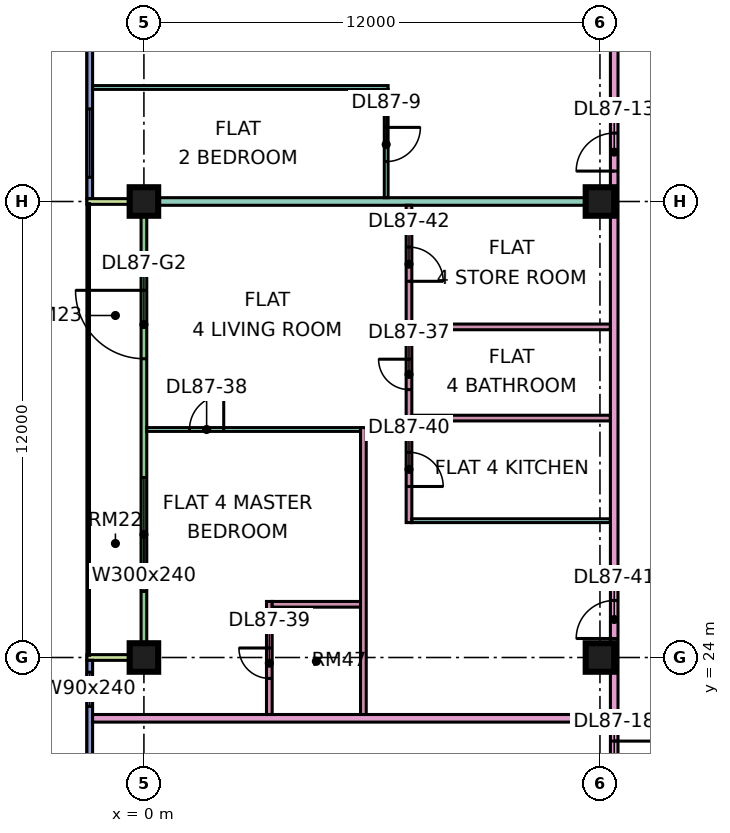
"""IFC4 building model, lengths in metres.
Left out: names, types, materials, properties, quantities, classifications, styles, units other than length and angle.
Written with IfcOpenShell. Run it as: python <this file> out.ifc"""

import sys

from ifc_helpers import new_model, si_unit, direction, frame, frame_2d, origin, origin_2d, place, context, subcontext, project, spatial, rectangle, extrude, element, fill, save


model = new_model("IFC4")
c1 = context("Model", 3, precision=1e-05, world=origin(), true_north=direction((0.0, 1.0)))
c2 = subcontext(c1, "Body", "Model", "MODEL_VIEW")
j1 = project(units=[si_unit("LENGTHUNIT", "METRE"), si_unit("PLANEANGLEUNIT", "RADIAN")], contexts=[c1])
p1 = place(None, origin())
s1 = spatial("IfcSite", under=j1, at=p1, CompositionType="ELEMENT")
p2 = place(p1, origin())
s2 = spatial("IfcBuilding", under=s1, at=p2, CompositionType="ELEMENT")
p3 = place(p2, frame((0.0, 0.0, 372.65)))
s3 = spatial("IfcBuildingStorey", under=s2, at=p3, CompositionType="ELEMENT", Elevation=372.65)
p4 = place(p3, frame((0.0, 24.0, 0.0), z_axis=(0.0, 0.0, 1.0), x_axis=(1.0, 0.0, 0.0)))
e1 = element("IfcColumn", 1, at=p4, inside=s3, PredefinedType="COLUMN", context=c2, shape_type="SweptSolid", body=[
    extrude(rectangle(XDim=0.75, YDim=0.75, at=origin_2d()), origin(), (0.0, 0.0, 1.0), 3.75),
])
p5 = place(p3, frame((0.0, 36.0, 0.0), z_axis=(0.0, 0.0, 1.0), x_axis=(1.0, 0.0, 0.0)))
e2 = element("IfcColumn", 2, at=p5, inside=s3, PredefinedType="COLUMN", context=c2, shape_type="SweptSolid", body=[
    extrude(rectangle(XDim=0.75, YDim=0.75, at=origin_2d()), origin(), (0.0, 0.0, 1.0), 3.75),
])
for number, where, z_axis, x_axis in (
    (3, (12.0, 24.0, 0.0), (0.0, 0.0, 1.0), (1.0, 0.0, 0.0)),
    (4, (12.0, 36.0, 0.0), (0.0, 0.0, 1.0), (1.0, 0.0, 0.0)),
):
    element("IfcColumn", number, at=place(p3, frame(where, z_axis=z_axis, x_axis=x_axis)), inside=s3, PredefinedType="COLUMN", context=c2, shape_type="SweptSolid", body=[
        extrude(rectangle(XDim=0.75, YDim=0.75, at=origin_2d()), origin(), (0.0, 0.0, 1.0), 3.75),
    ])
p6 = place(p3, frame((-1.425, 47.925, 0.0), z_axis=(0.0, 0.0, 1.0), x_axis=(0.0, -1.0, 0.0)))
e5 = element("IfcWall", 5, at=p6, inside=s3, PredefinedType="SOLIDWALL", context=c2, shape_type="SweptSolid", body=[
    extrude(rectangle(XDim=11.85, YDim=0.15, at=frame_2d((5.925, 0.0))), origin(), (0.0, 0.0, 1.0), 3.35),
])
p7 = place(p6, frame((0.562, 0.0, 0.45)))
e6 = element("IfcOpeningElement", 6, at=p7, cuts=e5, PredefinedType="OPENING", context=c2, shape_type="SweptSolid", body=[
    extrude(rectangle(XDim=1.8, YDim=2.4, at=frame_2d((0.9, 1.2))), frame((0.0, 0.085, 0.0), z_axis=(0.0, -1.0, 0.0), x_axis=(1.0, 0.0, 0.0)), (0.0, 0.0, 1.0), 0.17),
])
p8 = place(p6, frame((4.425, 0.0, 0.45)))
e7 = element("IfcOpeningElement", 7, at=p8, cuts=e5, PredefinedType="OPENING", context=c2, shape_type="SweptSolid", body=[
    extrude(rectangle(XDim=3.0, YDim=2.4, at=frame_2d((1.5, 1.2))), frame((0.0, 0.085, 0.0), z_axis=(0.0, -1.0, 0.0), x_axis=(1.0, 0.0, 0.0)), (0.0, 0.0, 1.0), 0.17),
])
p9 = place(p6, frame((9.488, 0.0, 0.45)))
e8 = element("IfcOpeningElement", 8, at=p9, cuts=e5, PredefinedType="OPENING", context=c2, shape_type="SweptSolid", body=[
    extrude(rectangle(XDim=1.8, YDim=2.4, at=frame_2d((0.9, 1.2))), frame((0.0, 0.085, 0.0), z_axis=(0.0, -1.0, 0.0), x_axis=(1.0, 0.0, 0.0)), (0.0, 0.0, 1.0), 0.17),
])
p10 = place(p3, frame((0.0, 35.925, 0.0), z_axis=(0.0, 0.0, 1.0), x_axis=(0.0, -1.0, 0.0)))
e9 = element("IfcWall", 9, at=p10, inside=s3, PredefinedType="SOLIDWALL", context=c2, shape_type="SweptSolid", body=[
    extrude(rectangle(XDim=11.85, YDim=0.15, at=frame_2d((5.925, 0.0))), origin(), (0.0, 0.0, 1.0), 3.35),
])
p11 = place(p10, frame((2.262, 0.0, 0.0)))
e10 = element("IfcOpeningElement", 10, at=p11, cuts=e9, PredefinedType="OPENING", context=c2, shape_type="SweptSolid", body=[
    extrude(rectangle(XDim=1.8, YDim=2.4, at=frame_2d((0.9, 1.2))), frame((0.0, 0.085, 0.0), z_axis=(0.0, -1.0, 0.0), x_axis=(1.0, 0.0, 0.0)), (0.0, 0.0, 1.0), 0.17),
])
p12 = place(p10, frame((7.188, 0.0, 0.45)))
e11 = element("IfcOpeningElement", 11, at=p12, cuts=e9, PredefinedType="OPENING", context=c2, shape_type="SweptSolid", body=[
    extrude(rectangle(XDim=3.0, YDim=2.4, at=frame_2d((1.5, 1.2))), frame((0.0, 0.085, 0.0), z_axis=(0.0, -1.0, 0.0), x_axis=(1.0, 0.0, 0.0)), (0.0, 0.0, 1.0), 0.17),
])
for number, where, z_axis, x_axis in (
    (12, (-1.5, 36.0, 0.0), (0.0, 0.0, 1.0), (1.0, 0.0, 0.0)),
    (13, (-1.5, 24.0, 0.0), (0.0, 0.0, 1.0), (1.0, 0.0, 0.0)),
):
    element("IfcWall", number, at=place(p3, frame(where, z_axis=z_axis, x_axis=x_axis)), inside=s3, PredefinedType="SOLIDWALL", context=c2, shape_type="SweptSolid", body=[
        extrude(rectangle(XDim=1.5, YDim=0.15, at=frame_2d((0.75, 0.0))), origin(), (0.0, 0.0, 1.0), 3.35),
    ])
p13 = place(p3, frame((-1.425, 23.925, 0.0), z_axis=(0.0, 0.0, 1.0), x_axis=(0.0, -1.0, 0.0)))
e14 = element("IfcWall", 14, at=p13, inside=s3, PredefinedType="SOLIDWALL", context=c2, shape_type="SweptSolid", body=[
    extrude(rectangle(XDim=11.425, YDim=0.15, at=frame_2d((5.712, 0.0))), origin(), (0.0, 0.0, 1.0), 3.35),
])
p14 = place(p13, frame((0.312, 0.0, 0.45)))
e15 = element("IfcOpeningElement", 15, at=p14, cuts=e14, PredefinedType="OPENING", context=c2, shape_type="SweptSolid", body=[
    extrude(rectangle(XDim=0.9, YDim=2.4, at=frame_2d((0.45, 1.2))), frame((0.0, 0.085, 0.0), z_axis=(0.0, -1.0, 0.0), x_axis=(1.0, 0.0, 0.0)), (0.0, 0.0, 1.0), 0.17),
])
p15 = place(p13, frame((6.175, 0.0, 0.45)))
e16 = element("IfcOpeningElement", 16, at=p15, cuts=e14, PredefinedType="OPENING", context=c2, shape_type="SweptSolid", body=[
    extrude(rectangle(XDim=3.0, YDim=2.4, at=frame_2d((1.5, 1.2))), frame((0.0, 0.085, 0.0), z_axis=(0.0, -1.0, 0.0), x_axis=(1.0, 0.0, 0.0)), (0.0, 0.0, 1.0), 0.17),
])
p16 = place(p3, frame((-1.35, 22.4, 0.0), z_axis=(0.0, 0.0, 1.0), x_axis=(1.0, 0.0, 0.0)))
e17 = element("IfcWall", 17, at=p16, inside=s3, PredefinedType="PARTITIONING", context=c2, shape_type="SweptSolid", body=[
    extrude(rectangle(XDim=13.625, YDim=0.2, at=frame_2d((6.812, 0.0))), origin(), (0.0, 0.0, 1.0), 3.35),
])
e18 = element("IfcWall", 18, at=p5, inside=s3, PredefinedType="PARTITIONING", context=c2, shape_type="SweptSolid", body=[
    extrude(rectangle(XDim=12.275, YDim=0.2, at=frame_2d((6.137, 0.0))), origin(), (0.0, 0.0, 1.0), 3.35),
])
p17 = place(p3, frame((-1.35, 39.0, 0.0), z_axis=(0.0, 0.0, 1.0), x_axis=(1.0, 0.0, 0.0)))
e19 = element("IfcWall", 19, at=p17, inside=s3, PredefinedType="PARTITIONING", context=c2, shape_type="SweptSolid", body=[
    extrude(rectangle(XDim=7.775, YDim=0.1, at=frame_2d((3.888, 0.0))), origin(), (0.0, 0.0, 1.0), 3.35),
])
p18 = place(p3, frame((0.074, 30.0, 0.0), z_axis=(0.0, 0.0, 1.0), x_axis=(1.0, 0.0, 0.0)))
e20 = element("IfcWall", 20, at=p18, inside=s3, PredefinedType="PARTITIONING", context=c2, shape_type="SweptSolid", body=[
    extrude(rectangle(XDim=5.626, YDim=0.1, at=frame_2d((2.813, 0.0))), origin(), (0.0, 0.0, 1.0), 3.35),
])
p19 = place(p18, frame((1.126, 0.0, 0.0)))
e21 = element("IfcOpeningElement", 21, at=p19, cuts=e20, PredefinedType="OPENING", context=c2, shape_type="SweptSolid", body=[
    extrude(rectangle(XDim=0.9, YDim=2.1, at=frame_2d((0.45, 1.05))), frame((0.0, 0.06, 0.0), z_axis=(0.0, -1.0, 0.0), x_axis=(1.0, 0.0, 0.0)), (0.0, 0.0, 1.0), 0.12),
])
p20 = place(p3, frame((3.3, 22.5, 0.0), z_axis=(0.0, 0.0, 1.0), x_axis=(0.0, 1.0, 0.0)))
e22 = element("IfcWall", 22, at=p20, inside=s3, PredefinedType="PARTITIONING", context=c2, shape_type="SweptSolid", body=[
    extrude(rectangle(XDim=2.975, YDim=0.15, at=frame_2d((1.488, 0.0))), origin(), (0.0, 0.0, 1.0), 3.35),
])
p21 = place(p20, frame((0.95, 0.0, 0.0)))
e23 = element("IfcOpeningElement", 23, at=p21, cuts=e22, PredefinedType="OPENING", context=c2, shape_type="SweptSolid", body=[
    extrude(rectangle(XDim=0.8, YDim=2.1, at=frame_2d((0.4, 1.05))), frame((0.0, 0.085, 0.0), z_axis=(0.0, -1.0, 0.0), x_axis=(1.0, 0.0, 0.0)), (0.0, 0.0, 1.0), 0.17),
])
p22 = place(p3, frame((3.375, 25.4, 0.0), z_axis=(0.0, 0.0, 1.0), x_axis=(1.0, 0.0, 0.0)))
e24 = element("IfcWall", 24, at=p22, inside=s3, PredefinedType="PARTITIONING", context=c2, shape_type="SweptSolid", body=[
    extrude(rectangle(XDim=2.325, YDim=0.15, at=frame_2d((1.163, 0.0))), origin(), (0.0, 0.0, 1.0), 3.35),
])
p23 = place(p3, frame((5.775, 22.5, 0.0), z_axis=(0.0, 0.0, 1.0), x_axis=(0.0, 1.0, 0.0)))
e25 = element("IfcWall", 25, at=p23, inside=s3, PredefinedType="PARTITIONING", context=c2, shape_type="SweptSolid", body=[
    extrude(rectangle(XDim=7.55, YDim=0.15, at=frame_2d((3.775, 0.0))), origin(), (0.0, 0.0, 1.0), 3.35),
])
p24 = place(p3, frame((6.375, 36.1, 0.0), z_axis=(0.0, 0.0, 1.0), x_axis=(0.0, 1.0, 0.0)))
e26 = element("IfcWall", 26, at=p24, inside=s3, PredefinedType="PARTITIONING", context=c2, shape_type="SweptSolid", body=[
    extrude(rectangle(XDim=2.85, YDim=0.1, at=frame_2d((1.425, 0.0))), origin(), (0.0, 0.0, 1.0), 3.35),
])
p25 = place(p24, frame((0.95, 0.0, 0.0)))
e27 = element("IfcOpeningElement", 27, at=p25, cuts=e26, PredefinedType="OPENING", context=c2, shape_type="SweptSolid", body=[
    extrude(rectangle(XDim=0.9, YDim=2.1, at=frame_2d((0.45, 1.05))), frame((0.0, 0.06, 0.0), z_axis=(0.0, -1.0, 0.0), x_axis=(1.0, 0.0, 0.0)), (0.0, 0.0, 1.0), 0.12),
])
p26 = place(p3, frame((6.975, 27.55, 0.0), z_axis=(0.0, 0.0, 1.0), x_axis=(0.0, 1.0, 0.0)))
e28 = element("IfcWall", 28, at=p26, inside=s3, PredefinedType="PARTITIONING", context=c2, shape_type="SweptSolid", body=[
    extrude(rectangle(XDim=8.35, YDim=0.15, at=frame_2d((4.175, 0.0))), origin(), (0.0, 0.0, 1.0), 3.35),
])
p27 = place(p26, frame((3.5, 0.0, 0.0)))
e29 = element("IfcOpeningElement", 29, at=p27, cuts=e28, PredefinedType="OPENING", context=c2, shape_type="SweptSolid", body=[
    extrude(rectangle(XDim=0.8, YDim=2.1, at=frame_2d((0.4, 1.05))), frame((0.0, 0.085, 0.0), z_axis=(0.0, -1.0, 0.0), x_axis=(1.0, 0.0, 0.0)), (0.0, 0.0, 1.0), 0.17),
])
p28 = place(p26, frame((0.95, 0.0, 0.0)))
e30 = element("IfcOpeningElement", 30, at=p28, cuts=e28, PredefinedType="OPENING", context=c2, shape_type="SweptSolid", body=[
    extrude(rectangle(XDim=0.9, YDim=2.1, at=frame_2d((0.45, 1.05))), frame((0.0, 0.085, 0.0), z_axis=(0.0, -1.0, 0.0), x_axis=(1.0, 0.0, 0.0)), (0.0, 0.0, 1.0), 0.17),
])
p29 = place(p26, frame((6.35, 0.0, 0.0)))
e31 = element("IfcOpeningElement", 31, at=p29, cuts=e28, PredefinedType="OPENING", context=c2, shape_type="SweptSolid", body=[
    extrude(rectangle(XDim=0.9, YDim=2.1, at=frame_2d((0.45, 1.05))), frame((0.0, 0.085, 0.0), z_axis=(0.0, -1.0, 0.0), x_axis=(1.0, 0.0, 0.0)), (0.0, 0.0, 1.0), 0.17),
])
p30 = place(p3, frame((7.05, 27.6, 0.0), z_axis=(0.0, 0.0, 1.0), x_axis=(1.0, 0.0, 0.0)))
e32 = element("IfcWall", 32, at=p30, inside=s3, PredefinedType="PARTITIONING", context=c2, shape_type="SweptSolid", body=[
    extrude(rectangle(XDim=5.225, YDim=0.1, at=frame_2d((2.612, 0.0))), origin(), (0.0, 0.0, 1.0), 3.35),
])
for number, where, z_axis, x_axis in (
    (33, (7.05, 30.3, 0.0), (0.0, 0.0, 1.0), (1.0, 0.0, 0.0)),
    (34, (7.05, 32.7, 0.0), (0.0, 0.0, 1.0), (1.0, 0.0, 0.0)),
):
    element("IfcWall", number, at=place(p3, frame(where, z_axis=z_axis, x_axis=x_axis)), inside=s3, PredefinedType="PARTITIONING", context=c2, shape_type="SweptSolid", body=[
        extrude(rectangle(XDim=5.225, YDim=0.15, at=frame_2d((2.612, 0.0))), origin(), (0.0, 0.0, 1.0), 3.35),
    ])
p31 = place(p3, frame((12.375, 20.0, 0.0), z_axis=(0.0, 0.0, 1.0), x_axis=(0.0, 1.0, 0.0)))
e35 = element("IfcWall", 35, at=p31, inside=s3, PredefinedType="PARTITIONING", context=c2, shape_type="SweptSolid", body=[
    extrude(rectangle(XDim=34.0, YDim=0.2, at=frame_2d((17.0, 0.0))), origin(), (0.0, 0.0, 1.0), 3.35),
])
p32 = place(p31, frame((16.8, 0.0, 0.0)))
e36 = element("IfcOpeningElement", 36, at=p32, cuts=e35, PredefinedType="OPENING", context=c2, shape_type="SweptSolid", body=[
    extrude(rectangle(XDim=1.0, YDim=2.1, at=frame_2d((0.5, 1.05))), frame((0.0, 0.11, 0.0), z_axis=(0.0, -1.0, 0.0), x_axis=(1.0, 0.0, 0.0)), (0.0, 0.0, 1.0), 0.22),
])
p33 = place(p31, frame((0.6, 0.0, 0.0)))
e37 = element("IfcOpeningElement", 37, at=p33, cuts=e35, PredefinedType="OPENING", context=c2, shape_type="SweptSolid", body=[
    extrude(rectangle(XDim=1.2, YDim=2.1, at=frame_2d((0.6, 1.05))), frame((0.0, 0.11, 0.0), z_axis=(0.0, -1.0, 0.0), x_axis=(1.0, 0.0, 0.0)), (0.0, 0.0, 1.0), 0.22),
])
p34 = place(p31, frame((4.5, 0.0, 0.0)))
e38 = element("IfcOpeningElement", 38, at=p34, cuts=e35, PredefinedType="OPENING", context=c2, shape_type="SweptSolid", body=[
    extrude(rectangle(XDim=1.0, YDim=2.1, at=frame_2d((0.5, 1.05))), frame((0.0, 0.11, 0.0), z_axis=(0.0, -1.0, 0.0), x_axis=(1.0, 0.0, 0.0)), (0.0, 0.0, 1.0), 0.22),
])
p35 = place(p9, origin())
e39 = element("IfcWindow", 39, at=p35, inside=s3, PartitioningType="SINGLE_PANEL", PredefinedType="WINDOW", context=c2, shape_type="SweptSolid", body=[
    extrude(rectangle(XDim=1.8, YDim=2.4, at=frame_2d((0.9, 1.2))), frame((0.0, 0.03, 0.0), z_axis=(0.0, -1.0, 0.0), x_axis=(1.0, 0.0, 0.0)), (0.0, 0.0, 1.0), 0.06),
])
fill(e8, e39)
p36 = place(p11, frame((1.8, 0.0, 0.0), z_axis=(0.0, 0.0, 1.0), x_axis=(-1.0, 0.0, 0.0)))
e40 = element("IfcDoor", 40, at=p36, inside=s3, OperationType="DOUBLE_DOOR_SINGLE_SWING", PredefinedType="DOOR", context=c2, shape_type="SweptSolid", body=[
    extrude(rectangle(XDim=1.8, YDim=2.4, at=frame_2d((0.9, 1.2))), frame((0.0, 0.025, 0.0), z_axis=(0.0, -1.0, 0.0), x_axis=(1.0, 0.0, 0.0)), (0.0, 0.0, 1.0), 0.05),
])
fill(e10, e40)
p37 = place(p12, origin())
e41 = element("IfcWindow", 41, at=p37, inside=s3, PartitioningType="SINGLE_PANEL", PredefinedType="WINDOW", context=c2, shape_type="SweptSolid", body=[
    extrude(rectangle(XDim=3.0, YDim=2.4, at=frame_2d((1.5, 1.2))), frame((0.0, 0.03, 0.0), z_axis=(0.0, -1.0, 0.0), x_axis=(1.0, 0.0, 0.0)), (0.0, 0.0, 1.0), 0.06),
])
fill(e11, e41)
p38 = place(p14, origin())
e42 = element("IfcWindow", 42, at=p38, inside=s3, PartitioningType="SINGLE_PANEL", PredefinedType="WINDOW", context=c2, shape_type="SweptSolid", body=[
    extrude(rectangle(XDim=0.9, YDim=2.4, at=frame_2d((0.45, 1.2))), frame((0.0, 0.03, 0.0), z_axis=(0.0, -1.0, 0.0), x_axis=(1.0, 0.0, 0.0)), (0.0, 0.0, 1.0), 0.06),
])
fill(e15, e42)
p39 = place(p25, origin())
e43 = element("IfcDoor", 43, at=p39, inside=s3, OperationType="SINGLE_SWING_RIGHT", PredefinedType="DOOR", context=c2, shape_type="SweptSolid", body=[
    extrude(rectangle(XDim=0.9, YDim=2.1, at=frame_2d((0.45, 1.05))), frame((0.0, 0.025, 0.0), z_axis=(0.0, -1.0, 0.0), x_axis=(1.0, 0.0, 0.0)), (0.0, 0.0, 1.0), 0.05),
])
fill(e27, e43)
p40 = place(p32, origin())
e44 = element("IfcDoor", 44, at=p40, inside=s3, OperationType="SINGLE_SWING_LEFT", PredefinedType="DOOR", context=c2, shape_type="SweptSolid", body=[
    extrude(rectangle(XDim=1.0, YDim=2.1, at=frame_2d((0.5, 1.05))), frame((0.0, 0.025, 0.0), z_axis=(0.0, -1.0, 0.0), x_axis=(1.0, 0.0, 0.0)), (0.0, 0.0, 1.0), 0.05),
])
fill(e36, e44)
p41 = place(p33, origin())
e45 = element("IfcDoor", 45, at=p41, inside=s3, OperationType="SINGLE_SWING_RIGHT", PredefinedType="DOOR", context=c2, shape_type="SweptSolid", body=[
    extrude(rectangle(XDim=1.2, YDim=2.1, at=frame_2d((0.6, 1.05))), frame((0.0, 0.025, 0.0), z_axis=(0.0, -1.0, 0.0), x_axis=(1.0, 0.0, 0.0)), (0.0, 0.0, 1.0), 0.05),
])
fill(e37, e45)
p42 = place(p27, frame((0.8, 0.0, 0.0), z_axis=(0.0, 0.0, 1.0), x_axis=(-1.0, 0.0, 0.0)))
e46 = element("IfcDoor", 46, at=p42, inside=s3, OperationType="SINGLE_SWING_RIGHT", PredefinedType="DOOR", context=c2, shape_type="SweptSolid", body=[
    extrude(rectangle(XDim=0.8, YDim=2.1, at=frame_2d((0.4, 1.05))), frame((0.0, 0.025, 0.0), z_axis=(0.0, -1.0, 0.0), x_axis=(1.0, 0.0, 0.0)), (0.0, 0.0, 1.0), 0.05),
])
fill(e29, e46)
p43 = place(p19, frame((0.9, 0.0, 0.0), z_axis=(0.0, 0.0, 1.0), x_axis=(-1.0, 0.0, 0.0)))
e47 = element("IfcDoor", 47, at=p43, inside=s3, OperationType="SINGLE_SWING_RIGHT", PredefinedType="DOOR", context=c2, shape_type="SweptSolid", body=[
    extrude(rectangle(XDim=0.9, YDim=2.1, at=frame_2d((0.45, 1.05))), frame((0.0, 0.025, 0.0), z_axis=(0.0, -1.0, 0.0), x_axis=(1.0, 0.0, 0.0)), (0.0, 0.0, 1.0), 0.05),
])
fill(e21, e47)
p44 = place(p21, frame((0.8, 0.0, 0.0), z_axis=(0.0, 0.0, 1.0), x_axis=(-1.0, 0.0, 0.0)))
e48 = element("IfcDoor", 48, at=p44, inside=s3, OperationType="SINGLE_SWING_RIGHT", PredefinedType="DOOR", context=c2, shape_type="SweptSolid", body=[
    extrude(rectangle(XDim=0.8, YDim=2.1, at=frame_2d((0.4, 1.05))), frame((0.0, 0.025, 0.0), z_axis=(0.0, -1.0, 0.0), x_axis=(1.0, 0.0, 0.0)), (0.0, 0.0, 1.0), 0.05),
])
fill(e23, e48)
p45 = place(p28, frame((0.9, 0.0, 0.0), z_axis=(0.0, 0.0, 1.0), x_axis=(-1.0, 0.0, 0.0)))
e49 = element("IfcDoor", 49, at=p45, inside=s3, OperationType="SINGLE_SWING_LEFT", PredefinedType="DOOR", context=c2, shape_type="SweptSolid", body=[
    extrude(rectangle(XDim=0.9, YDim=2.1, at=frame_2d((0.45, 1.05))), frame((0.0, 0.025, 0.0), z_axis=(0.0, -1.0, 0.0), x_axis=(1.0, 0.0, 0.0)), (0.0, 0.0, 1.0), 0.05),
])
fill(e30, e49)
p46 = place(p34, origin())
e50 = element("IfcDoor", 50, at=p46, inside=s3, OperationType="SINGLE_SWING_LEFT", PredefinedType="DOOR", context=c2, shape_type="SweptSolid", body=[
    extrude(rectangle(XDim=1.0, YDim=2.1, at=frame_2d((0.5, 1.05))), frame((0.0, 0.025, 0.0), z_axis=(0.0, -1.0, 0.0), x_axis=(1.0, 0.0, 0.0)), (0.0, 0.0, 1.0), 0.05),
])
fill(e38, e50)
p47 = place(p29, frame((0.9, 0.0, 0.0), z_axis=(0.0, 0.0, 1.0), x_axis=(-1.0, 0.0, 0.0)))
e51 = element("IfcDoor", 51, at=p47, inside=s3, OperationType="SINGLE_SWING_LEFT", PredefinedType="DOOR", context=c2, shape_type="SweptSolid", body=[
    extrude(rectangle(XDim=0.9, YDim=2.1, at=frame_2d((0.45, 1.05))), frame((0.0, 0.025, 0.0), z_axis=(0.0, -1.0, 0.0), x_axis=(1.0, 0.0, 0.0)), (0.0, 0.0, 1.0), 0.05),
])
fill(e31, e51)
save(model, sys.argv[1])
